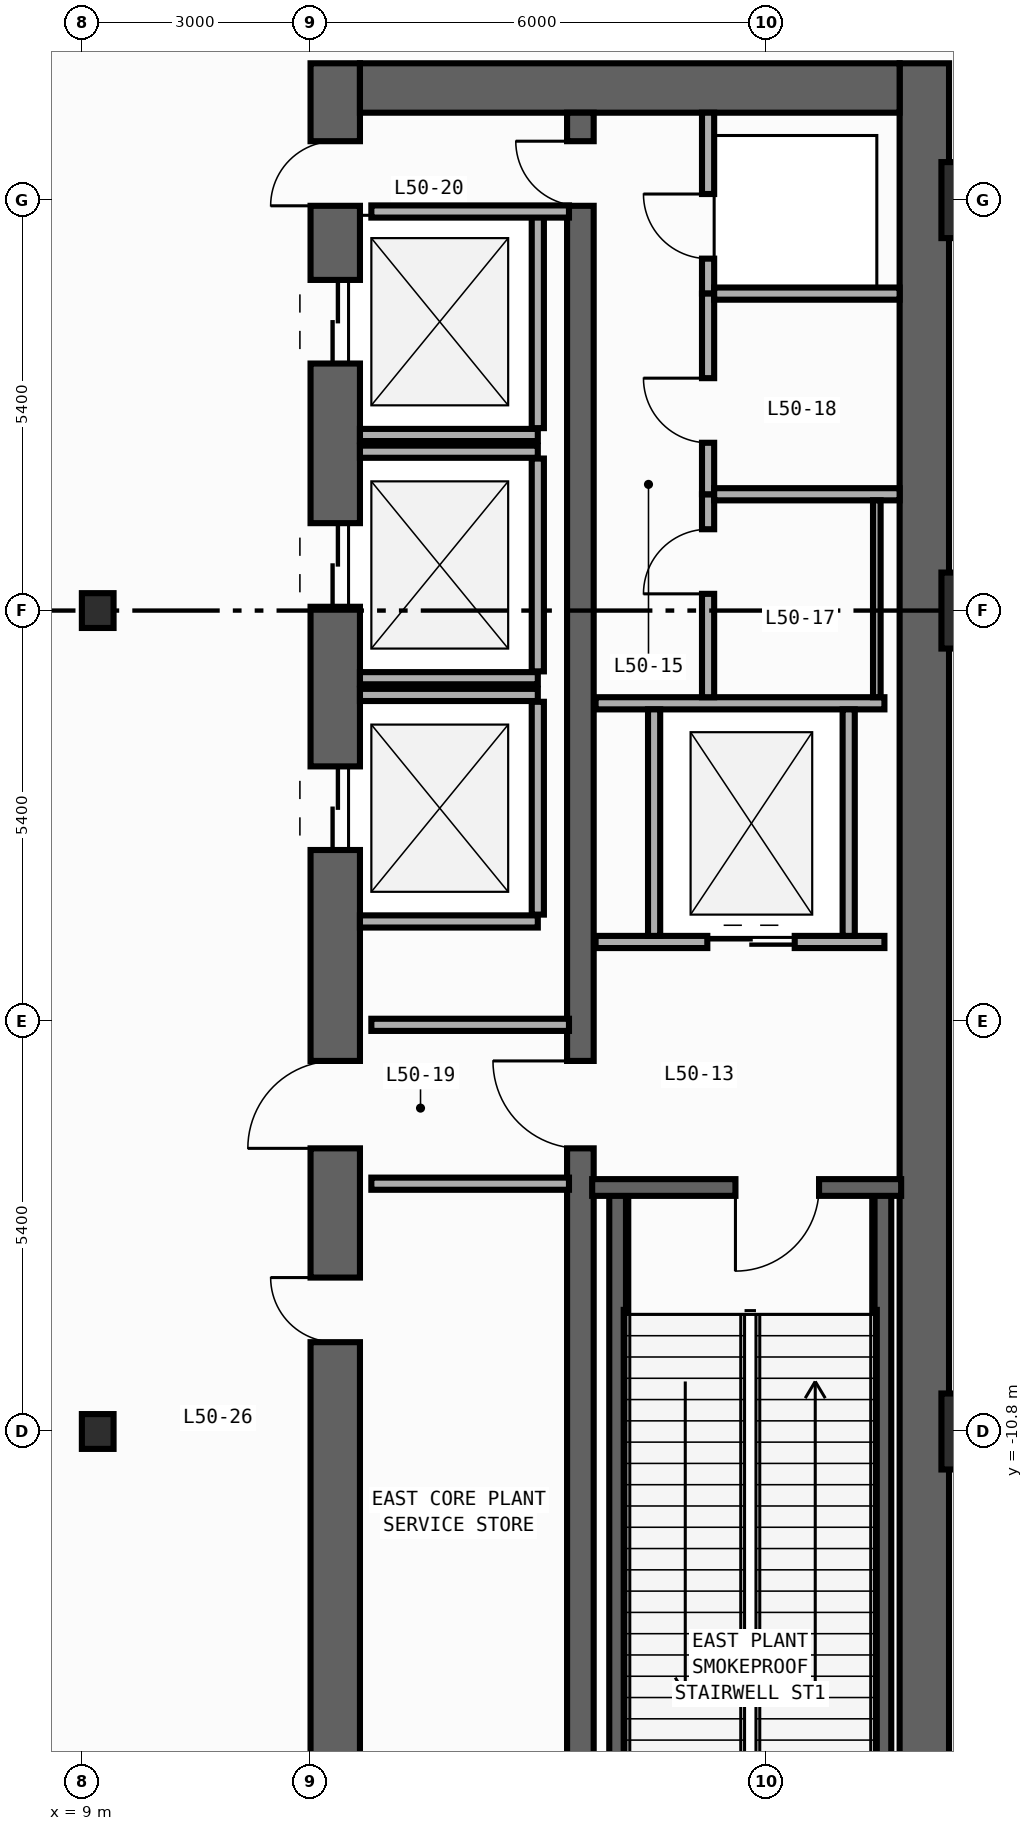
"""IFC4 building model, lengths in metres.
Left out: names, types, materials, properties, quantities, classifications, styles, units other than length and angle.
Written with IfcOpenShell. Run it as: python <this file> out.ifc"""

import sys

from ifc_helpers import new_model, si_unit, direction, frame, frame_2d, origin, origin_2d, place, context, subcontext, project, spatial, rectangle, i_section, extrude, element, fill, save


model = new_model("IFC4")
c1 = context("Model", 3, precision=1e-05, world=origin(), true_north=direction((0.0, 1.0)))
c2 = subcontext(c1, "Body", "Model", "MODEL_VIEW")
j1 = project(units=[si_unit("LENGTHUNIT", "METRE"), si_unit("PLANEANGLEUNIT", "RADIAN")], contexts=[c1])
p1 = place(None, origin())
s1 = spatial("IfcSite", under=j1, at=p1, CompositionType="ELEMENT")
p2 = place(p1, origin())
s2 = spatial("IfcBuilding", under=s1, at=p2, CompositionType="ELEMENT")
p3 = place(p2, frame((0.0, 0.0, 214.4)))
s3 = spatial("IfcBuildingStorey", under=s2, at=p3, CompositionType="ELEMENT", Elevation=214.4)
p4 = place(p3, frame((12.325, -19.8, 0.0), z_axis=(0.0, 0.0, 1.0), x_axis=(0.0, 1.0, 0.0)))
e1 = element("IfcWall", 1, at=p4, inside=s3, PredefinedType="SHEAR", context=c2, shape_type="SweptSolid", body=[
    extrude(rectangle(XDim=27.0, YDim=0.65, at=frame_2d((13.5, 0.0))), origin(), (0.0, 0.0, 1.0), 7.74),
])
p5 = place(p4, frame((23.05, 0.0, 0.0)))
e2 = element("IfcOpeningElement", 2, at=p5, cuts=e1, PredefinedType="OPENING", context=c2, shape_type="SweptSolid", body=[
    extrude(rectangle(XDim=1.1, YDim=2.2, at=frame_2d((0.55, 1.1))), frame((0.0, 0.335, 0.0), z_axis=(0.0, -1.0, 0.0), x_axis=(1.0, 0.0, 0.0)), (0.0, 0.0, 1.0), 0.67),
])
p6 = place(p4, frame((19.85, 0.0, 0.0)))
e3 = element("IfcOpeningElement", 3, at=p6, cuts=e1, PredefinedType="OPENING", context=c2, shape_type="SweptSolid", body=[
    extrude(rectangle(XDim=1.1, YDim=2.2, at=frame_2d((0.55, 1.1))), frame((0.0, 0.335, 0.0), z_axis=(0.0, -1.0, 0.0), x_axis=(1.0, 0.0, 0.0)), (0.0, 0.0, 1.0), 0.67),
])
p7 = place(p4, frame((16.65, 0.0, 0.0)))
e4 = element("IfcOpeningElement", 4, at=p7, cuts=e1, PredefinedType="OPENING", context=c2, shape_type="SweptSolid", body=[
    extrude(rectangle(XDim=1.1, YDim=2.2, at=frame_2d((0.55, 1.1))), frame((0.0, 0.335, 0.0), z_axis=(0.0, -1.0, 0.0), x_axis=(1.0, 0.0, 0.0)), (0.0, 0.0, 1.0), 0.67),
])
p8 = place(p4, frame((10.175, 0.0, 0.0)))
e5 = element("IfcOpeningElement", 5, at=p8, cuts=e1, PredefinedType="OPENING", context=c2, shape_type="SweptSolid", body=[
    extrude(rectangle(XDim=0.85, YDim=2.1, at=frame_2d((0.425, 1.05))), frame((0.0, 0.335, 0.0), z_axis=(0.0, -1.0, 0.0), x_axis=(1.0, 0.0, 0.0)), (0.0, 0.0, 1.0), 0.67),
])
p9 = place(p4, frame((12.725, 0.0, 0.0)))
e6 = element("IfcOpeningElement", 6, at=p9, cuts=e1, PredefinedType="OPENING", context=c2, shape_type="SweptSolid", body=[
    extrude(rectangle(XDim=1.15, YDim=2.2, at=frame_2d((0.575, 1.1))), frame((0.0, 0.335, 0.0), z_axis=(0.0, -1.0, 0.0), x_axis=(1.0, 0.0, 0.0)), (0.0, 0.0, 1.0), 0.67),
])
p10 = place(p4, frame((25.125, 0.0, 0.0)))
e7 = element("IfcOpeningElement", 7, at=p10, cuts=e1, PredefinedType="OPENING", context=c2, shape_type="SweptSolid", body=[
    extrude(rectangle(XDim=0.85, YDim=2.1, at=frame_2d((0.425, 1.05))), frame((0.0, 0.335, 0.0), z_axis=(0.0, -1.0, 0.0), x_axis=(1.0, 0.0, 0.0)), (0.0, 0.0, 1.0), 0.67),
])
p11 = place(p3, frame((20.075, -19.8, 0.0), z_axis=(0.0, 0.0, 1.0), x_axis=(0.0, 1.0, 0.0)))
e8 = element("IfcWall", 8, at=p11, inside=s3, PredefinedType="SHEAR", context=c2, shape_type="SweptSolid", body=[
    extrude(rectangle(XDim=27.0, YDim=0.65, at=frame_2d((13.5, 0.0))), origin(), (0.0, 0.0, 1.0), 7.74),
])
p12 = place(p3, frame((12.65, 6.875, 0.0), z_axis=(0.0, 0.0, 1.0), x_axis=(1.0, 0.0, 0.0)))
e9 = element("IfcWall", 9, at=p12, inside=s3, PredefinedType="SHEAR", context=c2, shape_type="SweptSolid", body=[
    extrude(rectangle(XDim=7.1, YDim=0.65, at=frame_2d((3.55, 0.0))), origin(), (0.0, 0.0, 1.0), 7.74),
])
p13 = place(p3, frame((15.55, -19.15, 0.0), z_axis=(0.0, 0.0, 1.0), x_axis=(0.0, 1.0, 0.0)))
e10 = element("IfcWall", 10, at=p13, inside=s3, PredefinedType="SHEAR", context=c2, shape_type="SweptSolid", body=[
    extrude(rectangle(XDim=25.7, YDim=0.35, at=frame_2d((12.85, 0.0))), origin(), (0.0, 0.0, 1.0), 7.74),
])
p14 = place(p13, frame((12.075, 0.0, 0.0)))
e11 = element("IfcOpeningElement", 11, at=p14, cuts=e10, PredefinedType="OPENING", context=c2, shape_type="SweptSolid", body=[
    extrude(rectangle(XDim=1.15, YDim=2.2, at=frame_2d((0.575, 1.1))), frame((0.0, 0.185, 0.0), z_axis=(0.0, -1.0, 0.0), x_axis=(1.0, 0.0, 0.0)), (0.0, 0.0, 1.0), 0.37),
])
p15 = place(p13, frame((24.475, 0.0, 0.0)))
e12 = element("IfcOpeningElement", 12, at=p15, cuts=e10, PredefinedType="OPENING", context=c2, shape_type="SweptSolid", body=[
    extrude(rectangle(XDim=0.85, YDim=2.1, at=frame_2d((0.425, 1.05))), frame((0.0, 0.185, 0.0), z_axis=(0.0, -1.0, 0.0), x_axis=(1.0, 0.0, 0.0)), (0.0, 0.0, 1.0), 0.37),
])
for number, where, z_axis, x_axis in (
    (13, (16.04, -19.01, 0.0), (0.0, 0.0, 1.0), (0.0, 1.0, 0.0)),
    (14, (19.53, -19.01, 0.0), (0.0, 0.0, 1.0), (0.0, 1.0, 0.0)),
):
    element("IfcWall", number, at=place(p3, frame(where, z_axis=z_axis, x_axis=x_axis)), inside=s3, PredefinedType="SHEAR", context=c2, shape_type="SweptSolid", body=[
        extrude(rectangle(XDim=11.42, YDim=0.22, at=frame_2d((5.71, 0.0))), origin(), (0.0, 0.0, 1.0), 7.74),
    ])
p16 = place(p3, frame((19.77, -7.59, 0.0), z_axis=(0.0, 0.0, 1.0), x_axis=(-1.0, 0.0, 0.0)))
e15 = element("IfcWall", 15, at=p16, inside=s3, PredefinedType="SHEAR", context=c2, shape_type="SweptSolid", body=[
    extrude(rectangle(XDim=4.065, YDim=0.22, at=frame_2d((2.032, 0.0))), origin(), (0.0, 0.0, 1.0), 7.74),
])
p17 = place(p16, frame((1.08, 0.0, 0.0)))
e16 = element("IfcOpeningElement", 16, at=p17, cuts=e15, PredefinedType="OPENING", context=c2, shape_type="SweptSolid", body=[
    extrude(rectangle(XDim=1.1, YDim=2.2, at=frame_2d((0.55, 1.1))), frame((0.0, 0.12, 0.0), z_axis=(0.0, -1.0, 0.0), x_axis=(1.0, 0.0, 0.0)), (0.0, 0.0, 1.0), 0.24),
])
for number, where, z_axis, x_axis in (
    (17, (9.2, -10.8, 0.0), (0.0, 0.0, 1.0), (1.0, 0.0, 0.0)),
    (18, (9.2, 0.0, 0.0), (0.0, 0.0, 1.0), (1.0, 0.0, 0.0)),
):
    element("IfcColumn", number, at=place(p3, frame(where, z_axis=z_axis, x_axis=x_axis)), inside=s3, PredefinedType="COLUMN", context=c2, shape_type="SweptSolid", body=[
        extrude(i_section(OverallWidth=0.417, OverallDepth=0.458, WebThickness=0.03, FlangeThickness=0.05, FilletRadius=0.022, at=origin_2d()), origin(), (0.0, 0.0, 1.0), 8.0),
    ])
for number, where, z_axis, x_axis in (
    (19, (20.8, -10.8, 0.0), (0.0, 0.0, 1.0), (1.0, 0.0, 0.0)),
    (20, (20.8, 0.0, 0.0), (0.0, 0.0, 1.0), (1.0, 0.0, 0.0)),
    (21, (20.8, 5.4, 0.0), (0.0, 0.0, 1.0), (1.0, 0.0, 0.0)),
):
    element("IfcColumn", number, at=place(p3, frame(where, z_axis=z_axis, x_axis=x_axis)), inside=s3, PredefinedType="COLUMN", context=c2, shape_type="SweptSolid", body=[
        extrude(rectangle(XDim=1.0, YDim=1.0, at=origin_2d()), origin(), (0.0, 0.0, 1.0), 8.0),
    ])
p18 = place(p3, frame((12.65, 2.31, 0.0), z_axis=(0.0, 0.0, 1.0), x_axis=(1.0, 0.0, 0.0)))
e22 = element("IfcWall", 22, at=p18, inside=s3, PredefinedType="STANDARD", context=c2, shape_type="SweptSolid", body=[
    extrude(rectangle(XDim=2.34, YDim=0.16, at=frame_2d((1.17, 0.0))), origin(), (0.0, 0.0, 1.0), 7.74),
])
p19 = place(p3, frame((14.99, 2.4, 0.0), z_axis=(0.0, 0.0, 1.0), x_axis=(0.0, 1.0, 0.0)))
e23 = element("IfcWall", 23, at=p19, inside=s3, PredefinedType="STANDARD", context=c2, shape_type="SweptSolid", body=[
    extrude(rectangle(XDim=2.8, YDim=0.16, at=frame_2d((1.4, 0.0))), origin(), (0.0, 0.0, 1.0), 7.74),
])
for number, where, z_axis, x_axis in (
    (24, (12.65, -0.89, 0.0), (0.0, 0.0, 1.0), (1.0, 0.0, 0.0)),
    (25, (12.65, 2.09, 0.0), (0.0, 0.0, 1.0), (1.0, 0.0, 0.0)),
):
    element("IfcWall", number, at=place(p3, frame(where, z_axis=z_axis, x_axis=x_axis)), inside=s3, PredefinedType="STANDARD", context=c2, shape_type="SweptSolid", body=[
        extrude(rectangle(XDim=2.34, YDim=0.16, at=frame_2d((1.17, 0.0))), origin(), (0.0, 0.0, 1.0), 7.74),
    ])
p20 = place(p3, frame((14.99, -0.8, 0.0), z_axis=(0.0, 0.0, 1.0), x_axis=(0.0, 1.0, 0.0)))
e26 = element("IfcWall", 26, at=p20, inside=s3, PredefinedType="STANDARD", context=c2, shape_type="SweptSolid", body=[
    extrude(rectangle(XDim=2.8, YDim=0.16, at=frame_2d((1.4, 0.0))), origin(), (0.0, 0.0, 1.0), 7.74),
])
for number, where, z_axis, x_axis in (
    (27, (12.65, -4.09, 0.0), (0.0, 0.0, 1.0), (1.0, 0.0, 0.0)),
    (28, (12.65, -1.11, 0.0), (0.0, 0.0, 1.0), (1.0, 0.0, 0.0)),
):
    element("IfcWall", number, at=place(p3, frame(where, z_axis=z_axis, x_axis=x_axis)), inside=s3, PredefinedType="STANDARD", context=c2, shape_type="SweptSolid", body=[
        extrude(rectangle(XDim=2.34, YDim=0.16, at=frame_2d((1.17, 0.0))), origin(), (0.0, 0.0, 1.0), 7.74),
    ])
p21 = place(p3, frame((14.99, -4.0, 0.0), z_axis=(0.0, 0.0, 1.0), x_axis=(0.0, 1.0, 0.0)))
e29 = element("IfcWall", 29, at=p21, inside=s3, PredefinedType="STANDARD", context=c2, shape_type="SweptSolid", body=[
    extrude(rectangle(XDim=2.8, YDim=0.16, at=frame_2d((1.4, 0.0))), origin(), (0.0, 0.0, 1.0), 7.74),
])
p22 = place(p3, frame((15.75, -4.36, 0.0), z_axis=(0.0, 0.0, 1.0), x_axis=(1.0, 0.0, 0.0)))
e30 = element("IfcWall", 30, at=p22, inside=s3, PredefinedType="STANDARD", context=c2, shape_type="SweptSolid", body=[
    extrude(rectangle(XDim=3.8, YDim=0.16, at=frame_2d((1.9, 0.0))), origin(), (0.0, 0.0, 1.0), 7.74),
])
p23 = place(p22, frame((1.47, 0.0, 0.0)))
e31 = element("IfcOpeningElement", 31, at=p23, cuts=e30, PredefinedType="OPENING", context=c2, shape_type="SweptSolid", body=[
    extrude(rectangle(XDim=1.15, YDim=2.2, at=frame_2d((0.575, 1.1))), frame((0.0, 0.09, 0.0), z_axis=(0.0, -1.0, 0.0), x_axis=(1.0, 0.0, 0.0)), (0.0, 0.0, 1.0), 0.18),
])
p24 = place(p3, frame((15.75, -1.22, 0.0), z_axis=(0.0, 0.0, 1.0), x_axis=(1.0, 0.0, 0.0)))
e32 = element("IfcWall", 32, at=p24, inside=s3, PredefinedType="STANDARD", context=c2, shape_type="SweptSolid", body=[
    extrude(rectangle(XDim=3.8, YDim=0.16, at=frame_2d((1.9, 0.0))), origin(), (0.0, 0.0, 1.0), 7.74),
])
for number, where, z_axis, x_axis in (
    (33, (16.52, -4.28, 0.0), (0.0, 0.0, 1.0), (0.0, 1.0, 0.0)),
    (34, (19.08, -4.28, 0.0), (0.0, 0.0, 1.0), (0.0, 1.0, 0.0)),
):
    element("IfcWall", number, at=place(p3, frame(where, z_axis=z_axis, x_axis=x_axis)), inside=s3, PredefinedType="STANDARD", context=c2, shape_type="SweptSolid", body=[
        extrude(rectangle(XDim=2.98, YDim=0.16, at=frame_2d((1.49, 0.0))), origin(), (0.0, 0.0, 1.0), 7.74),
    ])
for number, where, z_axis, x_axis in (
    (35, (12.8, -5.45, 0.0), (0.0, 0.0, 1.0), (1.0, 0.0, 0.0)),
    (36, (12.8, -7.54, 0.0), (0.0, 0.0, 1.0), (1.0, 0.0, 0.0)),
    (37, (12.8, 5.25, 0.0), (0.0, 0.0, 1.0), (1.0, 0.0, 0.0)),
):
    element("IfcWall", number, at=place(p3, frame(where, z_axis=z_axis, x_axis=x_axis)), inside=s3, PredefinedType="STANDARD", context=c2, shape_type="SweptSolid", body=[
        extrude(rectangle(XDim=2.6, YDim=0.16, at=frame_2d((1.3, 0.0))), origin(), (0.0, 0.0, 1.0), 7.74),
    ])
p25 = place(p3, frame((17.23, 4.17, 0.0), z_axis=(0.0, 0.0, 1.0), x_axis=(0.0, 1.0, 0.0)))
e38 = element("IfcWall", 38, at=p25, inside=s3, PredefinedType="PARTITIONING", context=c2, shape_type="SweptSolid", body=[
    extrude(rectangle(XDim=2.38, YDim=0.16, at=frame_2d((1.19, 0.0))), origin(), (0.0, 0.0, 1.0), 7.74),
])
p26 = place(p25, frame((0.46, 0.0, 0.0)))
e39 = element("IfcOpeningElement", 39, at=p26, cuts=e38, PredefinedType="OPENING", context=c2, shape_type="SweptSolid", body=[
    extrude(rectangle(XDim=0.85, YDim=2.1, at=frame_2d((0.425, 1.05))), frame((0.0, 0.09, 0.0), z_axis=(0.0, -1.0, 0.0), x_axis=(1.0, 0.0, 0.0)), (0.0, 0.0, 1.0), 0.18),
])
p27 = place(p3, frame((17.23, -1.14, 0.0), z_axis=(0.0, 0.0, 1.0), x_axis=(0.0, 1.0, 0.0)))
e40 = element("IfcWall", 40, at=p27, inside=s3, PredefinedType="PARTITIONING", context=c2, shape_type="SweptSolid", body=[
    extrude(rectangle(XDim=2.67, YDim=0.16, at=frame_2d((1.335, 0.0))), origin(), (0.0, 0.0, 1.0), 7.74),
])
p28 = place(p27, frame((1.36, 0.0, 0.0)))
e41 = element("IfcOpeningElement", 41, at=p28, cuts=e40, PredefinedType="OPENING", context=c2, shape_type="SweptSolid", body=[
    extrude(rectangle(XDim=0.85, YDim=2.1, at=frame_2d((0.425, 1.05))), frame((0.0, 0.09, 0.0), z_axis=(0.0, -1.0, 0.0), x_axis=(1.0, 0.0, 0.0)), (0.0, 0.0, 1.0), 0.18),
])
p29 = place(p3, frame((17.23, 1.53, 0.0), z_axis=(0.0, 0.0, 1.0), x_axis=(0.0, 1.0, 0.0)))
e42 = element("IfcWall", 42, at=p29, inside=s3, PredefinedType="PARTITIONING", context=c2, shape_type="SweptSolid", body=[
    extrude(rectangle(XDim=2.64, YDim=0.16, at=frame_2d((1.32, 0.0))), origin(), (0.0, 0.0, 1.0), 7.74),
])
p30 = place(p29, frame((0.677, 0.0, 0.0)))
e43 = element("IfcOpeningElement", 43, at=p30, cuts=e42, PredefinedType="OPENING", context=c2, shape_type="SweptSolid", body=[
    extrude(rectangle(XDim=0.85, YDim=2.1, at=frame_2d((0.425, 1.05))), frame((0.0, 0.09, 0.0), z_axis=(0.0, -1.0, 0.0), x_axis=(1.0, 0.0, 0.0)), (0.0, 0.0, 1.0), 0.18),
])
for number, where, z_axis, x_axis in (
    (44, (17.31, 4.17, 0.0), (0.0, 0.0, 1.0), (1.0, 0.0, 0.0)),
    (45, (17.31, 1.53, 0.0), (0.0, 0.0, 1.0), (1.0, 0.0, 0.0)),
):
    element("IfcWall", number, at=place(p3, frame(where, z_axis=z_axis, x_axis=x_axis)), inside=s3, PredefinedType="PARTITIONING", context=c2, shape_type="SweptSolid", body=[
        extrude(rectangle(XDim=2.44, YDim=0.16, at=frame_2d((1.22, 0.0))), origin(), (0.0, 0.0, 1.0), 7.74),
    ])
p31 = place(p3, frame((19.45, 1.45, 0.0), z_axis=(0.0, 0.0, 1.0), x_axis=(0.0, -1.0, 0.0)))
e46 = element("IfcWall", 46, at=p31, inside=s3, PredefinedType="PARTITIONING", context=c2, shape_type="SweptSolid", body=[
    extrude(rectangle(XDim=2.59, YDim=0.1, at=frame_2d((1.295, 0.0))), origin(), (0.0, 0.0, 1.0), 7.74),
])
p32 = place(p17, origin())
e47 = element("IfcDoor", 47, at=p32, inside=s3, OperationType="SINGLE_SWING_RIGHT", PredefinedType="DOOR", context=c2, shape_type="SweptSolid", body=[
    extrude(rectangle(XDim=1.1, YDim=2.2, at=frame_2d((0.55, 1.1))), frame((0.0, 0.025, 0.0), z_axis=(0.0, -1.0, 0.0), x_axis=(1.0, 0.0, 0.0)), (0.0, 0.0, 1.0), 0.05),
])
fill(e16, e47)
p33 = place(p5, origin())
e48 = element("IfcDoor", 48, at=p33, inside=s3, OperationType="DOUBLE_DOOR_SLIDING", PredefinedType="DOOR", context=c2, shape_type="SweptSolid", body=[
    extrude(rectangle(XDim=1.1, YDim=2.2, at=frame_2d((0.55, 1.1))), frame((0.0, 0.025, 0.0), z_axis=(0.0, -1.0, 0.0), x_axis=(1.0, 0.0, 0.0)), (0.0, 0.0, 1.0), 0.05),
])
fill(e2, e48)
p34 = place(p6, origin())
e49 = element("IfcDoor", 49, at=p34, inside=s3, OperationType="DOUBLE_DOOR_SLIDING", PredefinedType="DOOR", context=c2, shape_type="SweptSolid", body=[
    extrude(rectangle(XDim=1.1, YDim=2.2, at=frame_2d((0.55, 1.1))), frame((0.0, 0.025, 0.0), z_axis=(0.0, -1.0, 0.0), x_axis=(1.0, 0.0, 0.0)), (0.0, 0.0, 1.0), 0.05),
])
fill(e3, e49)
p35 = place(p7, origin())
e50 = element("IfcDoor", 50, at=p35, inside=s3, OperationType="DOUBLE_DOOR_SLIDING", PredefinedType="DOOR", context=c2, shape_type="SweptSolid", body=[
    extrude(rectangle(XDim=1.1, YDim=2.2, at=frame_2d((0.55, 1.1))), frame((0.0, 0.025, 0.0), z_axis=(0.0, -1.0, 0.0), x_axis=(1.0, 0.0, 0.0)), (0.0, 0.0, 1.0), 0.05),
])
fill(e4, e50)
p36 = place(p8, origin())
e51 = element("IfcDoor", 51, at=p36, inside=s3, OperationType="SINGLE_SWING_RIGHT", PredefinedType="DOOR", context=c2, shape_type="SweptSolid", body=[
    extrude(rectangle(XDim=0.85, YDim=2.1, at=frame_2d((0.425, 1.05))), frame((0.0, 0.025, 0.0), z_axis=(0.0, -1.0, 0.0), x_axis=(1.0, 0.0, 0.0)), (0.0, 0.0, 1.0), 0.05),
])
fill(e5, e51)
p37 = place(p9, origin())
e52 = element("IfcDoor", 52, at=p37, inside=s3, OperationType="SINGLE_SWING_LEFT", PredefinedType="DOOR", context=c2, shape_type="SweptSolid", body=[
    extrude(rectangle(XDim=1.15, YDim=2.2, at=frame_2d((0.575, 1.1))), frame((0.0, 0.025, 0.0), z_axis=(0.0, -1.0, 0.0), x_axis=(1.0, 0.0, 0.0)), (0.0, 0.0, 1.0), 0.05),
])
fill(e6, e52)
p38 = place(p14, origin())
e53 = element("IfcDoor", 53, at=p38, inside=s3, OperationType="SINGLE_SWING_RIGHT", PredefinedType="DOOR", context=c2, shape_type="SweptSolid", body=[
    extrude(rectangle(XDim=1.15, YDim=2.2, at=frame_2d((0.575, 1.1))), frame((0.0, 0.025, 0.0), z_axis=(0.0, -1.0, 0.0), x_axis=(1.0, 0.0, 0.0)), (0.0, 0.0, 1.0), 0.05),
])
fill(e11, e53)
p39 = place(p10, origin())
e54 = element("IfcDoor", 54, at=p39, inside=s3, OperationType="SINGLE_SWING_LEFT", PredefinedType="DOOR", context=c2, shape_type="SweptSolid", body=[
    extrude(rectangle(XDim=0.85, YDim=2.1, at=frame_2d((0.425, 1.05))), frame((0.0, 0.025, 0.0), z_axis=(0.0, -1.0, 0.0), x_axis=(1.0, 0.0, 0.0)), (0.0, 0.0, 1.0), 0.05),
])
fill(e7, e54)
p40 = place(p15, origin())
e55 = element("IfcDoor", 55, at=p40, inside=s3, OperationType="SINGLE_SWING_RIGHT", PredefinedType="DOOR", context=c2, shape_type="SweptSolid", body=[
    extrude(rectangle(XDim=0.85, YDim=2.1, at=frame_2d((0.425, 1.05))), frame((0.0, 0.025, 0.0), z_axis=(0.0, -1.0, 0.0), x_axis=(1.0, 0.0, 0.0)), (0.0, 0.0, 1.0), 0.05),
])
fill(e12, e55)
p41 = place(p23, origin())
e56 = element("IfcDoor", 56, at=p41, inside=s3, OperationType="DOUBLE_DOOR_SLIDING", PredefinedType="DOOR", context=c2, shape_type="SweptSolid", body=[
    extrude(rectangle(XDim=1.15, YDim=2.2, at=frame_2d((0.575, 1.1))), frame((0.0, 0.025, 0.0), z_axis=(0.0, -1.0, 0.0), x_axis=(1.0, 0.0, 0.0)), (0.0, 0.0, 1.0), 0.05),
])
fill(e31, e56)
p42 = place(p26, origin())
e57 = element("IfcDoor", 57, at=p42, inside=s3, OperationType="SINGLE_SWING_RIGHT", PredefinedType="DOOR", context=c2, shape_type="SweptSolid", body=[
    extrude(rectangle(XDim=0.85, YDim=2.1, at=frame_2d((0.425, 1.05))), frame((0.0, 0.025, 0.0), z_axis=(0.0, -1.0, 0.0), x_axis=(1.0, 0.0, 0.0)), (0.0, 0.0, 1.0), 0.05),
])
fill(e39, e57)
p43 = place(p28, origin())
e58 = element("IfcDoor", 58, at=p43, inside=s3, OperationType="SINGLE_SWING_LEFT", PredefinedType="DOOR", context=c2, shape_type="SweptSolid", body=[
    extrude(rectangle(XDim=0.85, YDim=2.1, at=frame_2d((0.425, 1.05))), frame((0.0, 0.025, 0.0), z_axis=(0.0, -1.0, 0.0), x_axis=(1.0, 0.0, 0.0)), (0.0, 0.0, 1.0), 0.05),
])
fill(e41, e58)
p44 = place(p30, origin())
e59 = element("IfcDoor", 59, at=p44, inside=s3, OperationType="SINGLE_SWING_RIGHT", PredefinedType="DOOR", context=c2, shape_type="SweptSolid", body=[
    extrude(rectangle(XDim=0.85, YDim=2.1, at=frame_2d((0.425, 1.05))), frame((0.0, 0.025, 0.0), z_axis=(0.0, -1.0, 0.0), x_axis=(1.0, 0.0, 0.0)), (0.0, 0.0, 1.0), 0.05),
])
fill(e43, e59)
save(model, sys.argv[1])
